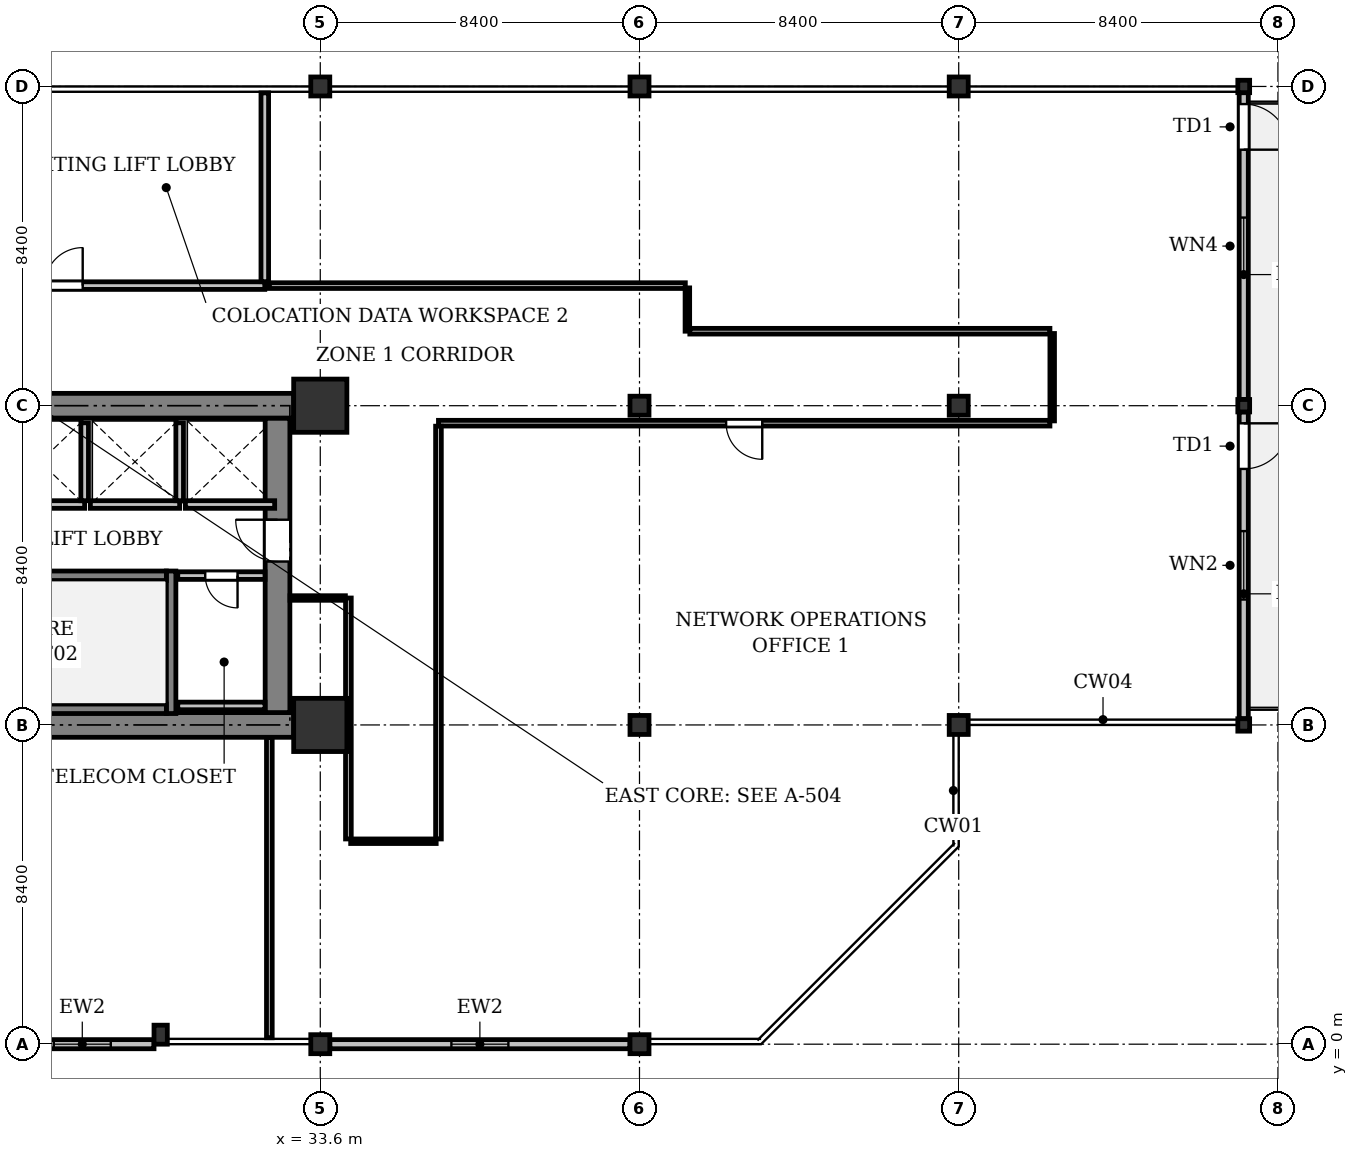
"""IFC4 building model, lengths in metres.
Left out: names, types, materials, properties, quantities, classifications, styles, units other than length and angle.
Written with IfcOpenShell. Run it as: python <this file> out.ifc"""

import sys

from ifc_helpers import new_model, si_unit, direction, frame, frame_2d, origin, origin_2d, place, context, subcontext, project, spatial, rectangle, i_section, extrude, element, fill, save


model = new_model("IFC4")
c1 = context("Model", 3, precision=1e-05, world=origin(), true_north=direction((0.0, 1.0)))
c2 = subcontext(c1, "Body", "Model", "MODEL_VIEW")
j1 = project(units=[si_unit("LENGTHUNIT", "METRE"), si_unit("PLANEANGLEUNIT", "RADIAN")], contexts=[c1])
p1 = place(None, origin())
s1 = spatial("IfcSite", under=j1, at=p1, CompositionType="ELEMENT")
p2 = place(p1, origin())
s2 = spatial("IfcBuilding", under=s1, at=p2, CompositionType="ELEMENT")
p3 = place(p2, frame((0.0, 0.0, 71.0)))
s3 = spatial("IfcBuildingStorey", under=s2, at=p3, CompositionType="ELEMENT", Elevation=71.0)
p4 = place(p3, frame((33.6, 0.0, 0.0), z_axis=(0.0, 0.0, 1.0), x_axis=(1.0, 0.0, 0.0)))
e1 = element("IfcColumn", 1, at=p4, inside=s3, PredefinedType="COLUMN", context=c2, shape_type="SweptSolid", body=[
    extrude(i_section(OverallWidth=0.5, OverallDepth=0.5, WebThickness=0.028, FlangeThickness=0.04, at=origin_2d()), origin(), (0.0, 0.0, 1.0), 4.2),
])
for number, where, z_axis, x_axis in (
    (2, (33.6, 8.4, 0.0), (0.0, 0.0, 1.0), (1.0, 0.0, 0.0)),
    (3, (33.6, 16.8, 0.0), (0.0, 0.0, 1.0), (1.0, 0.0, 0.0)),
):
    element("IfcColumn", number, at=place(p3, frame(where, z_axis=z_axis, x_axis=x_axis)), inside=s3, PredefinedType="COLUMN", context=c2, shape_type="SweptSolid", body=[
        extrude(rectangle(XDim=1.4, YDim=1.4, at=origin_2d()), origin(), (0.0, 0.0, 1.0), 4.2),
    ])
for number, where, z_axis, x_axis in (
    (4, (33.6, 25.2, 0.0), (0.0, 0.0, 1.0), (1.0, 0.0, 0.0)),
    (5, (42.0, 0.0, 0.0), (0.0, 0.0, 1.0), (1.0, 0.0, 0.0)),
    (6, (42.0, 8.4, 0.0), (0.0, 0.0, 1.0), (1.0, 0.0, 0.0)),
    (7, (42.0, 16.8, 0.0), (0.0, 0.0, 1.0), (1.0, 0.0, 0.0)),
    (8, (42.0, 25.2, 0.0), (0.0, 0.0, 1.0), (1.0, 0.0, 0.0)),
    (9, (50.4, 8.4, 0.0), (0.0, 0.0, 1.0), (1.0, 0.0, 0.0)),
    (10, (50.4, 16.8, 0.0), (0.0, 0.0, 1.0), (1.0, 0.0, 0.0)),
    (11, (50.4, 25.2, 0.0), (0.0, 0.0, 1.0), (1.0, 0.0, 0.0)),
):
    element("IfcColumn", number, at=place(p3, frame(where, z_axis=z_axis, x_axis=x_axis)), inside=s3, PredefinedType="COLUMN", context=c2, shape_type="SweptSolid", body=[
        extrude(i_section(OverallWidth=0.5, OverallDepth=0.5, WebThickness=0.028, FlangeThickness=0.04, at=origin_2d()), origin(), (0.0, 0.0, 1.0), 4.2),
    ])
for number, where, z_axis, x_axis in (
    (12, (57.9, 8.4, 0.0), (0.0, 0.0, 1.0), (1.0, 0.0, 0.0)),
    (13, (57.9, 16.8, 0.0), (0.0, 0.0, 1.0), (1.0, 0.0, 0.0)),
    (14, (57.9, 25.2, 0.0), (0.0, 0.0, 1.0), (1.0, 0.0, 0.0)),
):
    element("IfcColumn", number, at=place(p3, frame(where, z_axis=z_axis, x_axis=x_axis)), inside=s3, PredefinedType="COLUMN", context=c2, shape_type="SweptSolid", body=[
        extrude(i_section(OverallWidth=0.311, OverallDepth=0.327, WebThickness=0.016, FlangeThickness=0.025, FilletRadius=0.017, at=origin_2d()), origin(), (0.0, 0.0, 1.0), 4.2),
    ])
p5 = place(p3, frame((29.4, 0.25, 0.0), z_axis=(0.0, 0.0, 1.0), x_axis=(1.0, 0.0, 0.0)))
e15 = element("IfcColumn", 15, at=p5, inside=s3, PredefinedType="PILASTER", context=c2, shape_type="SweptSolid", body=[
    extrude(rectangle(XDim=0.35, YDim=0.5, at=origin_2d()), origin(), (0.0, 0.0, 1.0), 4.2),
])
p6 = place(p3, frame((57.9, 25.037, 0.0), z_axis=(0.0, 0.0, 1.0), x_axis=(0.0, -1.0, 0.0)))
e16 = element("IfcWall", 16, at=p6, inside=s3, PredefinedType="STANDARD", context=c2, shape_type="SweptSolid", body=[
    extrude(rectangle(XDim=8.073, YDim=0.24, at=frame_2d((4.037, 0.0))), origin(), (0.0, 0.0, 1.0), 3.522),
])
p7 = place(p6, frame((0.3, 0.0, 0.0)))
e17 = element("IfcOpeningElement", 17, at=p7, cuts=e16, PredefinedType="OPENING", context=c2, shape_type="SweptSolid", body=[
    extrude(rectangle(XDim=1.2, YDim=2.2, at=frame_2d((0.6, 1.1))), frame((0.0, 0.13, 0.0), z_axis=(0.0, -1.0, 0.0), x_axis=(1.0, 0.0, 0.0)), (0.0, 0.0, 1.0), 0.26),
])
p8 = place(p6, frame((3.287, 0.0, 0.9)))
e18 = element("IfcOpeningElement", 18, at=p8, cuts=e16, PredefinedType="OPENING", context=c2, shape_type="SweptSolid", body=[
    extrude(rectangle(XDim=1.5, YDim=1.6, at=frame_2d((0.75, 0.8))), frame((0.0, 0.13, 0.0), z_axis=(0.0, -1.0, 0.0), x_axis=(1.0, 0.0, 0.0)), (0.0, 0.0, 1.0), 0.26),
])
p9 = place(p3, frame((57.9, 16.636, 0.0), z_axis=(0.0, 0.0, 1.0), x_axis=(0.0, -1.0, 0.0)))
e19 = element("IfcWall", 19, at=p9, inside=s3, PredefinedType="STANDARD", context=c2, shape_type="SweptSolid", body=[
    extrude(rectangle(XDim=8.073, YDim=0.24, at=frame_2d((4.037, 0.0))), origin(), (0.0, 0.0, 1.0), 3.522),
])
p10 = place(p9, frame((0.3, 0.0, 0.0)))
e20 = element("IfcOpeningElement", 20, at=p10, cuts=e19, PredefinedType="OPENING", context=c2, shape_type="SweptSolid", body=[
    extrude(rectangle(XDim=1.2, YDim=2.2, at=frame_2d((0.6, 1.1))), frame((0.0, 0.13, 0.0), z_axis=(0.0, -1.0, 0.0), x_axis=(1.0, 0.0, 0.0)), (0.0, 0.0, 1.0), 0.26),
])
p11 = place(p9, frame((3.136, 0.0, 0.9)))
e21 = element("IfcOpeningElement", 21, at=p11, cuts=e19, PredefinedType="OPENING", context=c2, shape_type="SweptSolid", body=[
    extrude(rectangle(XDim=1.8, YDim=1.6, at=frame_2d((0.9, 0.8))), frame((0.0, 0.13, 0.0), z_axis=(0.0, -1.0, 0.0), x_axis=(1.0, 0.0, 0.0)), (0.0, 0.0, 1.0), 0.26),
])
p12 = place(p3, frame((41.75, 0.0, 0.0), z_axis=(0.0, 0.0, 1.0), x_axis=(-1.0, 0.0, 0.0)))
e22 = element("IfcWall", 22, at=p12, inside=s3, PredefinedType="STANDARD", context=c2, shape_type="SweptSolid", body=[
    extrude(rectangle(XDim=7.9, YDim=0.24, at=frame_2d((3.95, 0.0))), origin(), (0.0, 0.0, 1.0), 3.471),
])
p13 = place(p12, frame((3.2, 0.0, 0.9)))
e23 = element("IfcOpeningElement", 23, at=p13, cuts=e22, PredefinedType="OPENING", context=c2, shape_type="SweptSolid", body=[
    extrude(rectangle(XDim=1.5, YDim=1.6, at=frame_2d((0.75, 0.8))), frame((0.0, 0.13, 0.0), z_axis=(0.0, -1.0, 0.0), x_axis=(1.0, 0.0, 0.0)), (0.0, 0.0, 1.0), 0.26),
])
p14 = place(p3, frame((29.225, 0.0, 0.0), z_axis=(0.0, 0.0, 1.0), x_axis=(-1.0, 0.0, 0.0)))
e24 = element("IfcWall", 24, at=p14, inside=s3, PredefinedType="STANDARD", context=c2, shape_type="SweptSolid", body=[
    extrude(rectangle(XDim=3.775, YDim=0.24, at=frame_2d((1.888, 0.0))), origin(), (0.0, 0.0, 1.0), 3.471),
])
p15 = place(p14, frame((1.137, 0.0, 0.9)))
e25 = element("IfcOpeningElement", 25, at=p15, cuts=e24, PredefinedType="OPENING", context=c2, shape_type="SweptSolid", body=[
    extrude(rectangle(XDim=1.5, YDim=1.6, at=frame_2d((0.75, 0.8))), frame((0.0, 0.13, 0.0), z_axis=(0.0, -1.0, 0.0), x_axis=(1.0, 0.0, 0.0)), (0.0, 0.0, 1.0), 0.26),
])
p16 = place(p3, frame((25.9, 8.4, 0.0), z_axis=(0.0, 0.0, 1.0), x_axis=(1.0, 0.0, 0.0)))
e26 = element("IfcWall", 26, at=p16, inside=s3, PredefinedType="SHEAR", context=c2, shape_type="SweptSolid", body=[
    extrude(rectangle(XDim=7.0, YDim=0.65, at=frame_2d((3.5, 0.0))), origin(), (0.0, 0.0, 1.0), 3.925),
])
p17 = place(p3, frame((32.475, 8.725, 0.0), z_axis=(0.0, 0.0, 1.0), x_axis=(0.0, 1.0, 0.0)))
e27 = element("IfcWall", 27, at=p17, inside=s3, PredefinedType="SHEAR", context=c2, shape_type="SweptSolid", body=[
    extrude(rectangle(XDim=7.75, YDim=0.65, at=frame_2d((3.875, 0.0))), origin(), (0.0, 0.0, 1.0), 3.925),
])
p18 = place(p17, frame((3.975, 0.0, 0.0)))
e28 = element("IfcOpeningElement", 28, at=p18, cuts=e27, PredefinedType="OPENING", context=c2, shape_type="SweptSolid", body=[
    extrude(rectangle(XDim=1.1, YDim=2.15, at=frame_2d((0.55, 1.075))), frame((0.0, 0.335, 0.0), z_axis=(0.0, -1.0, 0.0), x_axis=(1.0, 0.0, 0.0)), (0.0, 0.0, 1.0), 0.67),
])
p19 = place(p3, frame((25.9, 16.8, 0.0), z_axis=(0.0, 0.0, 1.0), x_axis=(1.0, 0.0, 0.0)))
e29 = element("IfcWall", 29, at=p19, inside=s3, PredefinedType="SHEAR", context=c2, shape_type="SweptSolid", body=[
    extrude(rectangle(XDim=7.0, YDim=0.65, at=frame_2d((3.5, 0.0))), origin(), (0.0, 0.0, 1.0), 3.925),
])
p20 = place(p3, frame((29.675, 8.7, 0.0), z_axis=(0.0, 0.0, 1.0), x_axis=(0.0, 1.0, 0.0)))
e30 = element("IfcWall", 30, at=p20, inside=s3, PredefinedType="SHEAR", context=c2, shape_type="SweptSolid", body=[
    extrude(rectangle(XDim=3.75, YDim=0.25, at=frame_2d((1.875, 0.0))), origin(), (0.0, 0.0, 1.0), 3.925),
])
p21 = place(p3, frame((21.8, 8.825, 0.0), z_axis=(0.0, 0.0, 1.0), x_axis=(1.0, 0.0, 0.0)))
e31 = element("IfcWall", 31, at=p21, inside=s3, PredefinedType="SHEAR", context=c2, shape_type="SweptSolid", body=[
    extrude(rectangle(XDim=7.75, YDim=0.25, at=frame_2d((3.875, 0.0))), origin(), (0.0, 0.0, 1.0), 3.925),
])
p22 = place(p3, frame((21.8, 12.325, 0.0), z_axis=(0.0, 0.0, 1.0), x_axis=(1.0, 0.0, 0.0)))
e32 = element("IfcWall", 32, at=p22, inside=s3, PredefinedType="SHEAR", context=c2, shape_type="SweptSolid", body=[
    extrude(rectangle(XDim=7.75, YDim=0.25, at=frame_2d((3.875, 0.0))), origin(), (0.0, 0.0, 1.0), 3.925),
])
p23 = place(p22, frame((0.22, 0.0, 0.0)))
e33 = element("IfcOpeningElement", 33, at=p23, cuts=e32, PredefinedType="OPENING", context=c2, shape_type="SweptSolid", body=[
    extrude(rectangle(XDim=1.1, YDim=2.15, at=frame_2d((0.55, 1.075))), frame((0.0, 0.135, 0.0), z_axis=(0.0, -1.0, 0.0), x_axis=(1.0, 0.0, 0.0)), (0.0, 0.0, 1.0), 0.27),
])
p24 = place(p3, frame((25.05, 14.2, 0.0), z_axis=(0.0, 0.0, 1.0), x_axis=(1.0, 0.0, 0.0)))
e34 = element("IfcWall", 34, at=p24, inside=s3, PredefinedType="PARTITIONING", context=c2, shape_type="SweptSolid", body=[
    extrude(rectangle(XDim=2.35, YDim=0.2, at=frame_2d((1.175, 0.0))), origin(), (0.0, 0.0, 1.0), 3.925),
])
p25 = place(p3, frame((27.4, 14.3, 0.0), z_axis=(0.0, 0.0, 1.0), x_axis=(0.0, 1.0, 0.0)))
e35 = element("IfcWall", 35, at=p25, inside=s3, PredefinedType="PARTITIONING", context=c2, shape_type="SweptSolid", body=[
    extrude(rectangle(XDim=2.05, YDim=0.2, at=frame_2d((1.025, 0.0))), origin(), (0.0, 0.0, 1.0), 3.925),
])
p26 = place(p3, frame((27.55, 14.2, 0.0), z_axis=(0.0, 0.0, 1.0), x_axis=(1.0, 0.0, 0.0)))
e36 = element("IfcWall", 36, at=p26, inside=s3, PredefinedType="PARTITIONING", context=c2, shape_type="SweptSolid", body=[
    extrude(rectangle(XDim=2.35, YDim=0.2, at=frame_2d((1.175, 0.0))), origin(), (0.0, 0.0, 1.0), 3.925),
])
p27 = place(p3, frame((29.9, 14.3, 0.0), z_axis=(0.0, 0.0, 1.0), x_axis=(0.0, 1.0, 0.0)))
e37 = element("IfcWall", 37, at=p27, inside=s3, PredefinedType="PARTITIONING", context=c2, shape_type="SweptSolid", body=[
    extrude(rectangle(XDim=2.05, YDim=0.2, at=frame_2d((1.025, 0.0))), origin(), (0.0, 0.0, 1.0), 3.925),
])
p28 = place(p3, frame((30.05, 14.2, 0.0), z_axis=(0.0, 0.0, 1.0), x_axis=(1.0, 0.0, 0.0)))
e38 = element("IfcWall", 38, at=p28, inside=s3, PredefinedType="PARTITIONING", context=c2, shape_type="SweptSolid", body=[
    extrude(rectangle(XDim=2.35, YDim=0.2, at=frame_2d((1.175, 0.0))), origin(), (0.0, 0.0, 1.0), 3.925),
])
p29 = place(p3, frame((32.146, 12.33, 0.0), z_axis=(0.0, 0.0, 1.0), x_axis=(-1.0, 0.0, 0.0)))
e39 = element("IfcWall", 39, at=p29, inside=s3, PredefinedType="PARTITIONING", context=c2, shape_type="SweptSolid", body=[
    extrude(rectangle(XDim=2.296, YDim=0.2, at=frame_2d((1.148, 0.0))), origin(), (0.0, 0.0, 1.0), 3.925),
])
p30 = place(p29, frame((0.723, 0.0, 0.0)))
e40 = element("IfcOpeningElement", 40, at=p30, cuts=e39, PredefinedType="OPENING", context=c2, shape_type="SweptSolid", body=[
    extrude(rectangle(XDim=0.85, YDim=2.15, at=frame_2d((0.425, 1.075))), frame((0.0, 0.11, 0.0), z_axis=(0.0, -1.0, 0.0), x_axis=(1.0, 0.0, 0.0)), (0.0, 0.0, 1.0), 0.22),
])
p31 = place(p3, frame((29.85, 8.9, 0.0), z_axis=(0.0, 0.0, 1.0), x_axis=(1.0, 0.0, 0.0)))
e41 = element("IfcWall", 41, at=p31, inside=s3, PredefinedType="PARTITIONING", context=c2, shape_type="SweptSolid", body=[
    extrude(rectangle(XDim=2.296, YDim=0.2, at=frame_2d((1.148, 0.0))), origin(), (0.0, 0.0, 1.0), 3.925),
])
p32 = place(p3, frame((21.557, 19.96, 0.0), z_axis=(0.0, 0.0, 1.0), x_axis=(1.0, 0.0, 0.0)))
e42 = element("IfcWall", 42, at=p32, inside=s3, PredefinedType="PARTITIONING", context=c2, shape_type="SweptSolid", body=[
    extrude(rectangle(XDim=10.583, YDim=0.2, at=frame_2d((5.292, 0.0))), origin(), (0.0, 0.0, 1.0), 3.323),
])
p33 = place(p32, frame((4.792, 0.0, 0.0)))
e43 = element("IfcOpeningElement", 43, at=p33, cuts=e42, PredefinedType="OPENING", context=c2, shape_type="SweptSolid", body=[
    extrude(rectangle(XDim=1.0, YDim=2.15, at=frame_2d((0.5, 1.075))), frame((0.0, 0.11, 0.0), z_axis=(0.0, -1.0, 0.0), x_axis=(1.0, 0.0, 0.0)), (0.0, 0.0, 1.0), 0.22),
])
p34 = place(p3, frame((32.14, 20.064, 0.0), z_axis=(0.0, 0.0, 1.0), x_axis=(0.0, 1.0, 0.0)))
e44 = element("IfcWall", 44, at=p34, inside=s3, PredefinedType="PARTITIONING", context=c2, shape_type="SweptSolid", body=[
    extrude(rectangle(XDim=4.967, YDim=0.2, at=frame_2d((2.483, 0.0))), origin(), (0.0, 0.0, 1.0), 3.925),
])
p35 = place(p3, frame((32.26, 19.96, 0.0), z_axis=(0.0, 0.0, 1.0), x_axis=(0.999999999751, -2.2304501e-05, 0.0)))
e45 = element("IfcWall", 45, at=p35, inside=s3, PredefinedType="PARTITIONING", context=c2, shape_type="SweptSolid", body=[
    extrude(rectangle(XDim=10.946, YDim=0.15, at=frame_2d((5.473, 0.0))), origin(), (0.0, 0.0, 1.0), 3.323),
])
p36 = place(p3, frame((43.26, 19.9, 0.0), z_axis=(0.0, 0.0, 1.0), x_axis=(0.0, -1.0, 0.0)))
e46 = element("IfcWall", 46, at=p36, inside=s3, PredefinedType="PARTITIONING", context=c2, shape_type="SweptSolid", body=[
    extrude(rectangle(XDim=1.14, YDim=0.12, at=frame_2d((0.57, 0.0))), origin(), (0.0, 0.0, 1.0), 3.925),
])
p37 = place(p3, frame((43.324, 18.76, 0.0), z_axis=(0.0, 0.0, 1.0), x_axis=(1.0, 0.0, 0.0)))
e47 = element("IfcWall", 47, at=p37, inside=s3, PredefinedType="PARTITIONING", context=c2, shape_type="SweptSolid", body=[
    extrude(rectangle(XDim=9.476, YDim=0.15, at=frame_2d((4.738, 0.0))), origin(), (0.0, 0.0, 1.0), 3.323),
])
p38 = place(p3, frame((52.86, 18.7, 0.0), z_axis=(0.0, 0.0, 1.0), x_axis=(0.0, -1.0, 0.0)))
e48 = element("IfcWall", 48, at=p38, inside=s3, PredefinedType="PARTITIONING", context=c2, shape_type="SweptSolid", body=[
    extrude(rectangle(XDim=2.3, YDim=0.12, at=frame_2d((1.15, 0.0))), origin(), (0.0, 0.0, 1.0), 3.015),
])
p39 = place(p3, frame((52.8, 16.34, 0.0), z_axis=(0.0, 0.0, 1.0), x_axis=(-1.0, 0.0, 0.0)))
e49 = element("IfcWall", 49, at=p39, inside=s3, PredefinedType="PARTITIONING", context=c2, shape_type="SweptSolid", body=[
    extrude(rectangle(XDim=16.09, YDim=0.15, at=frame_2d((8.045, 0.0))), origin(), (0.0, 0.0, 1.0), 3.323),
])
p40 = place(p39, frame((7.57, 0.0, 0.0)))
e50 = element("IfcOpeningElement", 50, at=p40, cuts=e49, PredefinedType="OPENING", context=c2, shape_type="SweptSolid", body=[
    extrude(rectangle(XDim=0.95, YDim=2.15, at=frame_2d((0.475, 1.075))), frame((0.0, 0.085, 0.0), z_axis=(0.0, -1.0, 0.0), x_axis=(1.0, 0.0, 0.0)), (0.0, 0.0, 1.0), 0.17),
])
p41 = place(p3, frame((36.71, 16.261, 0.0), z_axis=(0.0, 0.0, 1.0), x_axis=(0.0, -1.0, 0.0)))
e51 = element("IfcWall", 51, at=p41, inside=s3, PredefinedType="PARTITIONING", context=c2, shape_type="SweptSolid", body=[
    extrude(rectangle(XDim=10.861, YDim=0.15, at=frame_2d((5.431, 0.0))), origin(), (0.0, 0.0, 1.0), 3.313),
])
p42 = place(p3, frame((36.65, 5.34, 0.0), z_axis=(0.0, 0.0, 1.0), x_axis=(-1.0, 0.0, 0.0)))
e52 = element("IfcWall", 52, at=p42, inside=s3, PredefinedType="PARTITIONING", context=c2, shape_type="SweptSolid", body=[
    extrude(rectangle(XDim=2.25, YDim=0.12, at=frame_2d((1.125, 0.0))), origin(), (0.0, 0.0, 1.0), 3.925),
])
p43 = place(p3, frame((34.34, 5.4, 0.0), z_axis=(0.0, 0.0, 1.0), x_axis=(0.0, 1.0, 0.0)))
e53 = element("IfcWall", 53, at=p43, inside=s3, PredefinedType="PARTITIONING", context=c2, shape_type="SweptSolid", body=[
    extrude(rectangle(XDim=6.34, YDim=0.15, at=frame_2d((3.17, 0.0))), origin(), (0.0, 0.0, 1.0), 3.313),
])
p44 = place(p3, frame((34.261, 11.74, 0.0), z_axis=(0.0, 0.0, 1.0), x_axis=(-1.0, 0.0, 0.0)))
e54 = element("IfcWall", 54, at=p44, inside=s3, PredefinedType="PARTITIONING", context=c2, shape_type="SweptSolid", body=[
    extrude(rectangle(XDim=1.457, YDim=0.12, at=frame_2d((0.729, 0.0))), origin(), (0.0, 0.0, 1.0), 3.323),
])
p45 = place(p3, frame((32.26, 8.071, 0.0), z_axis=(0.0, 0.0, 1.0), x_axis=(0.0, -1.0, 0.0)))
e55 = element("IfcWall", 55, at=p45, inside=s3, PredefinedType="PARTITIONING", context=c2, shape_type="SweptSolid", body=[
    extrude(rectangle(XDim=7.902, YDim=0.15, at=frame_2d((3.951, 0.0))), origin(), (0.0, 0.0, 1.0), 3.925),
])
p46 = place(p7, origin())
e56 = element("IfcDoor", 56, at=p46, inside=s3, OperationType="SINGLE_SWING_RIGHT", PredefinedType="DOOR", context=c2, shape_type="SweptSolid", body=[
    extrude(rectangle(XDim=1.2, YDim=2.2, at=frame_2d((0.6, 1.1))), frame((0.0, 0.025, 0.0), z_axis=(0.0, -1.0, 0.0), x_axis=(1.0, 0.0, 0.0)), (0.0, 0.0, 1.0), 0.05),
])
fill(e17, e56)
p47 = place(p8, origin())
e57 = element("IfcWindow", 57, at=p47, inside=s3, PartitioningType="SINGLE_PANEL", PredefinedType="WINDOW", context=c2, shape_type="SweptSolid", body=[
    extrude(rectangle(XDim=1.5, YDim=1.6, at=frame_2d((0.75, 0.8))), frame((0.0, 0.03, 0.0), z_axis=(0.0, -1.0, 0.0), x_axis=(1.0, 0.0, 0.0)), (0.0, 0.0, 1.0), 0.06),
])
fill(e18, e57)
p48 = place(p10, origin())
e58 = element("IfcDoor", 58, at=p48, inside=s3, OperationType="SINGLE_SWING_LEFT", PredefinedType="DOOR", context=c2, shape_type="SweptSolid", body=[
    extrude(rectangle(XDim=1.2, YDim=2.2, at=frame_2d((0.6, 1.1))), frame((0.0, 0.025, 0.0), z_axis=(0.0, -1.0, 0.0), x_axis=(1.0, 0.0, 0.0)), (0.0, 0.0, 1.0), 0.05),
])
fill(e20, e58)
p49 = place(p11, origin())
e59 = element("IfcWindow", 59, at=p49, inside=s3, PartitioningType="SINGLE_PANEL", PredefinedType="WINDOW", context=c2, shape_type="SweptSolid", body=[
    extrude(rectangle(XDim=1.8, YDim=1.6, at=frame_2d((0.9, 0.8))), frame((0.0, 0.03, 0.0), z_axis=(0.0, -1.0, 0.0), x_axis=(1.0, 0.0, 0.0)), (0.0, 0.0, 1.0), 0.06),
])
fill(e21, e59)
p50 = place(p13, origin())
e60 = element("IfcWindow", 60, at=p50, inside=s3, PartitioningType="SINGLE_PANEL", PredefinedType="WINDOW", context=c2, shape_type="SweptSolid", body=[
    extrude(rectangle(XDim=1.5, YDim=1.6, at=frame_2d((0.75, 0.8))), frame((0.0, 0.03, 0.0), z_axis=(0.0, -1.0, 0.0), x_axis=(1.0, 0.0, 0.0)), (0.0, 0.0, 1.0), 0.06),
])
fill(e23, e60)
p51 = place(p15, origin())
e61 = element("IfcWindow", 61, at=p51, inside=s3, PartitioningType="SINGLE_PANEL", PredefinedType="WINDOW", context=c2, shape_type="SweptSolid", body=[
    extrude(rectangle(XDim=1.5, YDim=1.6, at=frame_2d((0.75, 0.8))), frame((0.0, 0.03, 0.0), z_axis=(0.0, -1.0, 0.0), x_axis=(1.0, 0.0, 0.0)), (0.0, 0.0, 1.0), 0.06),
])
fill(e25, e61)
p52 = place(p18, origin())
e62 = element("IfcDoor", 62, at=p52, inside=s3, OperationType="SINGLE_SWING_RIGHT", PredefinedType="DOOR", context=c2, shape_type="SweptSolid", body=[
    extrude(rectangle(XDim=1.1, YDim=2.15, at=frame_2d((0.55, 1.075))), frame((0.0, 0.025, 0.0), z_axis=(0.0, -1.0, 0.0), x_axis=(1.0, 0.0, 0.0)), (0.0, 0.0, 1.0), 0.05),
])
fill(e28, e62)
p53 = place(p30, origin())
e63 = element("IfcDoor", 63, at=p53, inside=s3, OperationType="SINGLE_SWING_LEFT", PredefinedType="DOOR", context=c2, shape_type="SweptSolid", body=[
    extrude(rectangle(XDim=0.85, YDim=2.15, at=frame_2d((0.425, 1.075))), frame((0.0, 0.025, 0.0), z_axis=(0.0, -1.0, 0.0), x_axis=(1.0, 0.0, 0.0)), (0.0, 0.0, 1.0), 0.05),
])
fill(e40, e63)
p54 = place(p33, origin())
e64 = element("IfcDoor", 64, at=p54, inside=s3, OperationType="SINGLE_SWING_RIGHT", PredefinedType="DOOR", context=c2, shape_type="SweptSolid", body=[
    extrude(rectangle(XDim=1.0, YDim=2.15, at=frame_2d((0.5, 1.075))), frame((0.0, 0.025, 0.0), z_axis=(0.0, -1.0, 0.0), x_axis=(1.0, 0.0, 0.0)), (0.0, 0.0, 1.0), 0.05),
])
fill(e43, e64)
p55 = place(p40, origin())
e65 = element("IfcDoor", 65, at=p55, inside=s3, OperationType="SINGLE_SWING_LEFT", PredefinedType="DOOR", context=c2, shape_type="SweptSolid", body=[
    extrude(rectangle(XDim=0.95, YDim=2.15, at=frame_2d((0.475, 1.075))), frame((0.0, 0.025, 0.0), z_axis=(0.0, -1.0, 0.0), x_axis=(1.0, 0.0, 0.0)), (0.0, 0.0, 1.0), 0.05),
])
fill(e50, e65)
save(model, sys.argv[1])
